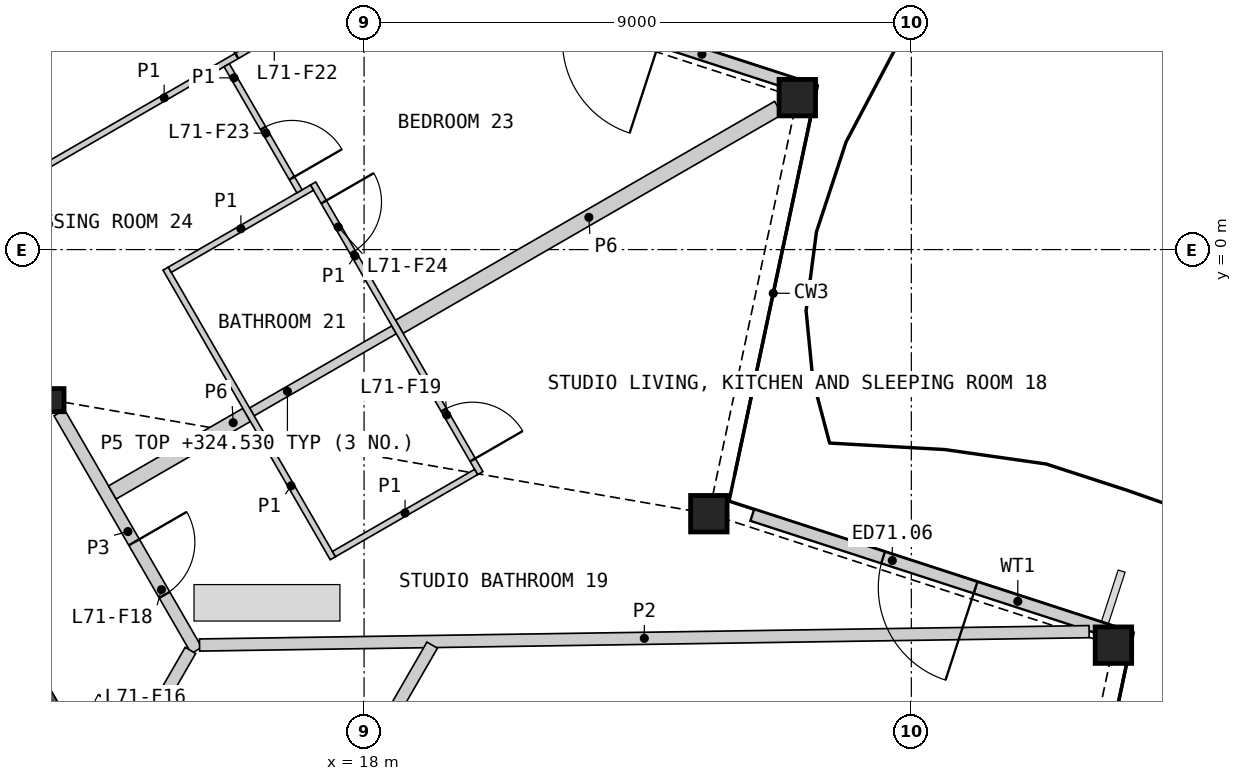
"""IFC4 building model, lengths in metres.
Left out: names, types, materials, properties, quantities, classifications, styles, units other than length and angle.
Written with IfcOpenShell. Run it as: python <this file> out.ifc"""

import sys

from ifc_helpers import new_model, si_unit, direction, frame, frame_2d, origin, origin_2d, place, context, subcontext, project, spatial, polyline, rectangle, hollow_rectangle, i_section, outline, extrude, element, fill, save


model = new_model("IFC4")
c1 = context("Model", 3, precision=1e-05, world=origin(), true_north=direction((0.0, 1.0)))
c2 = subcontext(c1, "Body", "Model", "MODEL_VIEW")
j1 = project(units=[si_unit("LENGTHUNIT", "METRE"), si_unit("PLANEANGLEUNIT", "RADIAN")], contexts=[c1])
p1 = place(None, origin())
s1 = spatial("IfcSite", under=j1, at=p1, CompositionType="ELEMENT")
p2 = place(p1, origin())
s2 = spatial("IfcBuilding", under=s1, at=p2, CompositionType="ELEMENT")
p3 = place(p2, frame((0.0, 0.0, 322.2)))
s3 = spatial("IfcBuildingStorey", under=s2, at=p3, CompositionType="ELEMENT", Elevation=322.2)
for number, where, z_axis, x_axis in (
    (1, (30.324, -6.506, 0.0), (0.0, 0.0, 1.0), (1.0, 0.0, 0.0)),
    (2, (23.67, -4.344, 0.0), (0.0, 0.0, 1.0), (1.0, 0.0, 0.0)),
    (3, (25.125, 2.499, 0.0), (0.0, 0.0, 1.0), (1.0, 0.0, 0.0)),
):
    element("IfcColumn", number, at=place(p3, frame(where, z_axis=z_axis, x_axis=x_axis)), inside=s3, PredefinedType="COLUMN", context=c2, shape_type="SweptSolid", body=[
        extrude(hollow_rectangle(XDim=0.6, YDim=0.6, WallThickness=0.04, at=origin_2d()), origin(), (0.0, 0.0, 1.0), 3.4),
    ])
p4 = place(p3, frame((12.868, -2.476, 0.0), z_axis=(0.0, 0.0, 1.0), x_axis=(1.0, 0.0, 0.0)))
e4 = element("IfcColumn", 4, at=p4, inside=s3, PredefinedType="COLUMN", context=c2, shape_type="SweptSolid", body=[
    extrude(i_section(OverallWidth=0.396, OverallDepth=0.381, WebThickness=0.019, FlangeThickness=0.03, at=origin_2d()), origin(), (0.0, 0.0, 1.0), 3.4),
])
p5 = place(p3, frame((30.207, -6.258, 0.0), z_axis=(0.0, 0.0, 1.0), x_axis=(-0.951056631566, 0.309016639608, 0.0)))
e5 = element("IfcWall", 5, at=p5, inside=s3, PredefinedType="SOLIDWALL", context=c2, shape_type="SweptSolid", body=[
    extrude(rectangle(XDim=6.122, YDim=0.2, at=frame_2d((3.061, 0.0))), origin(), (0.0, 0.0, 1.0), 2.488),
])
p6 = place(p5, frame((2.261, 0.0, 0.0)))
e6 = element("IfcOpeningElement", 6, at=p6, cuts=e5, PredefinedType="OPENING", context=c2, shape_type="SweptSolid", body=[
    extrude(rectangle(XDim=1.6, YDim=2.25, at=frame_2d((0.8, 1.125))), frame((0.0, 0.11, 0.0), z_axis=(0.0, -1.0, 0.0), x_axis=(1.0, 0.0, 0.0)), (0.0, 0.0, 1.0), 0.22),
])
p7 = place(p3, frame((25.012, 2.739, 0.0), z_axis=(0.0, 0.0, 1.0), x_axis=(-0.951056631566, 0.309016639608, 0.0)))
e7 = element("IfcWall", 7, at=p7, inside=s3, PredefinedType="SOLIDWALL", context=c2, shape_type="SweptSolid", body=[
    extrude(rectangle(XDim=6.122, YDim=0.2, at=frame_2d((3.061, 0.0))), origin(), (0.0, 0.0, 1.0), 2.488),
])
p8 = place(p7, frame((2.261, 0.0, 0.0)))
e8 = element("IfcOpeningElement", 8, at=p8, cuts=e7, PredefinedType="OPENING", context=c2, shape_type="SweptSolid", body=[
    extrude(rectangle(XDim=1.6, YDim=2.25, at=frame_2d((0.8, 1.125))), frame((0.0, 0.11, 0.0), z_axis=(0.0, -1.0, 0.0), x_axis=(1.0, 0.0, 0.0)), (0.0, 0.0, 1.0), 0.22),
])
p9 = place(p3, origin())
e9 = element("IfcWall", 9, at=p9, inside=s3, PredefinedType="SHEAR", context=c2, shape_type="SweptSolid", body=[
    extrude(outline(polyline([(11.961, -7.506), (11.961, -6.906), (12.48, -6.606), (13.0, -7.506), (11.961, -7.506)])), origin(), (0.0, 0.0, 1.0), 3.1),
])
p10 = place(p3, frame((18.58, -1.27, 0.0), z_axis=(0.0, 0.0, 1.0), x_axis=(0.866024647952, 0.500001309137, 0.0)))
e10 = element("IfcWall", 10, at=p10, inside=s3, PredefinedType="PARTITIONING", context=c2, shape_type="SweptSolid", body=[
    extrude(rectangle(XDim=7.2, YDim=0.25, at=frame_2d((3.6, 0.0))), origin(), (0.0, 0.0, 1.0), 2.33),
])
p11 = place(p3, frame((12.988, -2.684, 0.0), z_axis=(0.0, 0.0, 1.0), x_axis=(0.49999094734, -0.866030630277, 0.0)))
e11 = element("IfcWall", 11, at=p11, inside=s3, PredefinedType="PARTITIONING", context=c2, shape_type="SweptSolid", body=[
    extrude(rectangle(XDim=4.513, YDim=0.2, at=frame_2d((2.256, 0.0))), origin(), (0.0, 0.0, 1.0), 3.1),
])
p12 = place(p11, frame((2.459, 0.0, 0.0)))
e12 = element("IfcOpeningElement", 12, at=p12, cuts=e11, PredefinedType="OPENING", context=c2, shape_type="SweptSolid", body=[
    extrude(rectangle(XDim=1.0, YDim=2.1, at=frame_2d((0.5, 1.05))), frame((0.0, 0.11, 0.0), z_axis=(0.0, -1.0, 0.0), x_axis=(1.0, 0.0, 0.0)), (0.0, 0.0, 1.0), 0.22),
])
p13 = place(p3, frame((13.281, -9.819, 0.0), z_axis=(0.0, 0.0, 1.0), x_axis=(0.499958791762, 0.866049194065, 0.0)))
e13 = element("IfcWall", 13, at=p13, inside=s3, PredefinedType="PARTITIONING", context=c2, shape_type="SweptSolid", body=[
    extrude(rectangle(XDim=3.726, YDim=0.2, at=frame_2d((1.863, 0.0))), origin(), (0.0, 0.0, 1.0), 3.1),
])
p14 = place(p13, frame((1.388, 0.0, 0.0)))
e14 = element("IfcOpeningElement", 14, at=p14, cuts=e13, PredefinedType="OPENING", context=c2, shape_type="SweptSolid", body=[
    extrude(rectangle(XDim=0.95, YDim=2.1, at=frame_2d((0.475, 1.05))), frame((0.0, 0.11, 0.0), z_axis=(0.0, -1.0, 0.0), x_axis=(1.0, 0.0, 0.0)), (0.0, 0.0, 1.0), 0.22),
])
p15 = place(p3, frame((13.86, -3.995, 0.0), z_axis=(0.0, 0.0, 1.0), x_axis=(0.866030925526, 0.499990435942, 0.0)))
e15 = element("IfcWall", 15, at=p15, inside=s3, PredefinedType="PARTITIONING", context=c2, shape_type="SweptSolid", body=[
    extrude(rectangle(XDim=2.55, YDim=0.25, at=frame_2d((1.275, 0.0))), origin(), (0.0, 0.0, 1.0), 2.33),
])
p16 = place(p3, frame((15.294, -6.504, 0.0), z_axis=(0.0, 0.0, 1.0), x_axis=(0.999886982846, 0.015034012608, 0.0)))
e16 = element("IfcWall", 16, at=p16, inside=s3, PredefinedType="PARTITIONING", context=c2, shape_type="SweptSolid", body=[
    extrude(rectangle(XDim=14.632, YDim=0.2, at=frame_2d((7.316, 0.0))), origin(), (0.0, 0.0, 1.0), 2.33),
])
p17 = place(p3, frame((17.277, -9.698, 0.0), z_axis=(0.0, 0.0, 1.0), x_axis=(0.499978535015, 0.866037796245, 0.0)))
e17 = element("IfcWall", 17, at=p17, inside=s3, PredefinedType="PARTITIONING", context=c2, shape_type="SweptSolid", body=[
    extrude(rectangle(XDim=3.686, YDim=0.2, at=frame_2d((1.843, 0.0))), origin(), (0.0, 0.0, 1.0), 2.33),
])
p18 = place(p3, frame((16.155, -2.67, 0.0), z_axis=(0.0, 0.0, 1.0), x_axis=(0.86599734893, 0.500048589285, 0.0)))
e18 = element("IfcWall", 18, at=p18, inside=s3, PredefinedType="PLUMBINGWALL", context=c2, shape_type="SweptSolid", body=[
    extrude(rectangle(XDim=2.7, YDim=0.15, at=frame_2d((1.35, 0.0))), origin(), (0.0, 0.0, 1.0), 2.33),
])
p19 = place(p3, frame((11.262, 0.504, 0.0), z_axis=(0.0, 0.0, 1.0), x_axis=(0.866020217342, 0.500008983073, 0.0)))
e19 = element("IfcWall", 19, at=p19, inside=s3, PredefinedType="PARTITIONING", context=c2, shape_type="SweptSolid", body=[
    extrude(rectangle(XDim=7.966, YDim=0.1, at=frame_2d((3.983, 0.0))), origin(), (0.0, 0.0, 1.0), 2.33),
])
p20 = place(p19, frame((5.362, 0.0, 0.0)))
e20 = element("IfcOpeningElement", 20, at=p20, cuts=e19, PredefinedType="OPENING", context=c2, shape_type="SweptSolid", body=[
    extrude(rectangle(XDim=0.95, YDim=2.1, at=frame_2d((0.475, 1.05))), frame((0.0, 0.06, 0.0), z_axis=(0.0, -1.0, 0.0), x_axis=(1.0, 0.0, 0.0)), (0.0, 0.0, 1.0), 0.12),
])
p21 = place(p3, frame((17.161, 1.087, 0.0), z_axis=(0.0, 0.0, 1.0), x_axis=(0.499996545922, -0.866027397988, 0.0)))
e21 = element("IfcWall", 21, at=p21, inside=s3, PredefinedType="PARTITIONING", context=c2, shape_type="SweptSolid", body=[
    extrude(rectangle(XDim=5.5, YDim=0.1, at=frame_2d((2.75, 0.0))), origin(), (0.0, 0.0, 1.0), 2.33),
])
p22 = place(p21, frame((4.3, 0.0, 0.0)))
e22 = element("IfcOpeningElement", 22, at=p22, cuts=e21, PredefinedType="OPENING", context=c2, shape_type="SweptSolid", body=[
    extrude(rectangle(XDim=0.95, YDim=2.1, at=frame_2d((0.475, 1.05))), frame((0.0, 0.06, 0.0), z_axis=(0.0, -1.0, 0.0), x_axis=(1.0, 0.0, 0.0)), (0.0, 0.0, 1.0), 0.12),
])
p23 = place(p21, frame((0.351, 0.0, 0.0)))
e23 = element("IfcOpeningElement", 23, at=p23, cuts=e21, PredefinedType="OPENING", context=c2, shape_type="SweptSolid", body=[
    extrude(rectangle(XDim=0.95, YDim=2.1, at=frame_2d((0.475, 1.05))), frame((0.0, 0.06, 0.0), z_axis=(0.0, -1.0, 0.0), x_axis=(1.0, 0.0, 0.0)), (0.0, 0.0, 1.0), 0.12),
])
p24 = place(p3, frame((14.736, -0.313, 0.0), z_axis=(0.0, 0.0, 1.0), x_axis=(0.49997732567, -0.866038494419, 0.0)))
e24 = element("IfcWall", 24, at=p24, inside=s3, PredefinedType="PARTITIONING", context=c2, shape_type="SweptSolid", body=[
    extrude(rectangle(XDim=5.5, YDim=0.1, at=frame_2d((2.75, 0.0))), origin(), (0.0, 0.0, 1.0), 2.33),
])
p25 = place(p3, frame((17.505, -5.008, 0.0), z_axis=(0.0, 0.0, 1.0), x_axis=(0.866019956843, 0.50000943426, 0.0)))
e25 = element("IfcWall", 25, at=p25, inside=s3, PredefinedType="PARTITIONING", context=c2, shape_type="SweptSolid", body=[
    extrude(rectangle(XDim=2.7, YDim=0.1, at=frame_2d((1.35, 0.0))), origin(), (0.0, 0.0, 1.0), 2.33),
])
p26 = place(p3, frame((14.805, -0.331, 0.0), z_axis=(0.0, 0.0, 1.0), x_axis=(0.866059108428, 0.4999416173, 0.0)))
e26 = element("IfcWall", 26, at=p26, inside=s3, PredefinedType="PARTITIONING", context=c2, shape_type="SweptSolid", body=[
    extrude(rectangle(XDim=2.7, YDim=0.1, at=frame_2d((1.35, 0.0))), origin(), (0.0, 0.0, 1.0), 2.33),
])
p27 = place(p3, frame((15.74, 3.032, 0.0), z_axis=(0.0, 0.0, 1.0), x_axis=(0.500075453945, -0.865981836046, 0.0)))
e27 = element("IfcWall", 27, at=p27, inside=s3, PredefinedType="PARTITIONING", context=c2, shape_type="SweptSolid", body=[
    extrude(rectangle(XDim=2.395, YDim=0.1, at=frame_2d((1.197, 0.0))), origin(), (0.0, 0.0, 1.0), 2.33),
])
p28 = place(p27, frame((1.195, 0.0, 0.0)))
e28 = element("IfcOpeningElement", 28, at=p28, cuts=e27, PredefinedType="OPENING", context=c2, shape_type="SweptSolid", body=[
    extrude(rectangle(XDim=0.95, YDim=2.1, at=frame_2d((0.475, 1.05))), frame((0.0, 0.06, 0.0), z_axis=(0.0, -1.0, 0.0), x_axis=(1.0, 0.0, 0.0)), (0.0, 0.0, 1.0), 0.12),
])
p29 = place(p6, origin())
e29 = element("IfcDoor", 29, at=p29, inside=s3, OperationType="DOUBLE_DOOR_SINGLE_SWING", PredefinedType="DOOR", context=c2, shape_type="SweptSolid", body=[
    extrude(rectangle(XDim=1.6, YDim=2.25, at=frame_2d((0.8, 1.125))), frame((0.0, 0.025, 0.0), z_axis=(0.0, -1.0, 0.0), x_axis=(1.0, 0.0, 0.0)), (0.0, 0.0, 1.0), 0.05),
])
fill(e6, e29)
p30 = place(p12, origin())
e30 = element("IfcDoor", 30, at=p30, inside=s3, OperationType="SINGLE_SWING_LEFT", PredefinedType="DOOR", context=c2, shape_type="SweptSolid", body=[
    extrude(rectangle(XDim=1.0, YDim=2.1, at=frame_2d((0.5, 1.05))), frame((0.0, 0.025, 0.0), z_axis=(0.0, -1.0, 0.0), x_axis=(1.0, 0.0, 0.0)), (0.0, 0.0, 1.0), 0.05),
])
fill(e12, e30)
p31 = place(p22, origin())
e31 = element("IfcDoor", 31, at=p31, inside=s3, OperationType="SINGLE_SWING_RIGHT", PredefinedType="DOOR", context=c2, shape_type="SweptSolid", body=[
    extrude(rectangle(XDim=0.95, YDim=2.1, at=frame_2d((0.475, 1.05))), frame((0.0, 0.025, 0.0), z_axis=(0.0, -1.0, 0.0), x_axis=(1.0, 0.0, 0.0)), (0.0, 0.0, 1.0), 0.05),
])
fill(e22, e31)
p32 = place(p20, origin())
e32 = element("IfcDoor", 32, at=p32, inside=s3, OperationType="SINGLE_SWING_LEFT", PredefinedType="DOOR", context=c2, shape_type="SweptSolid", body=[
    extrude(rectangle(XDim=0.95, YDim=2.1, at=frame_2d((0.475, 1.05))), frame((0.0, 0.025, 0.0), z_axis=(0.0, -1.0, 0.0), x_axis=(1.0, 0.0, 0.0)), (0.0, 0.0, 1.0), 0.05),
])
fill(e20, e32)
p33 = place(p28, origin())
e33 = element("IfcDoor", 33, at=p33, inside=s3, OperationType="SINGLE_SWING_RIGHT", PredefinedType="DOOR", context=c2, shape_type="SweptSolid", body=[
    extrude(rectangle(XDim=0.95, YDim=2.1, at=frame_2d((0.475, 1.05))), frame((0.0, 0.025, 0.0), z_axis=(0.0, -1.0, 0.0), x_axis=(1.0, 0.0, 0.0)), (0.0, 0.0, 1.0), 0.05),
])
fill(e28, e33)
p34 = place(p23, origin())
e34 = element("IfcDoor", 34, at=p34, inside=s3, OperationType="SINGLE_SWING_LEFT", PredefinedType="DOOR", context=c2, shape_type="SweptSolid", body=[
    extrude(rectangle(XDim=0.95, YDim=2.1, at=frame_2d((0.475, 1.05))), frame((0.0, 0.025, 0.0), z_axis=(0.0, -1.0, 0.0), x_axis=(1.0, 0.0, 0.0)), (0.0, 0.0, 1.0), 0.05),
])
fill(e23, e34)
save(model, sys.argv[1])
